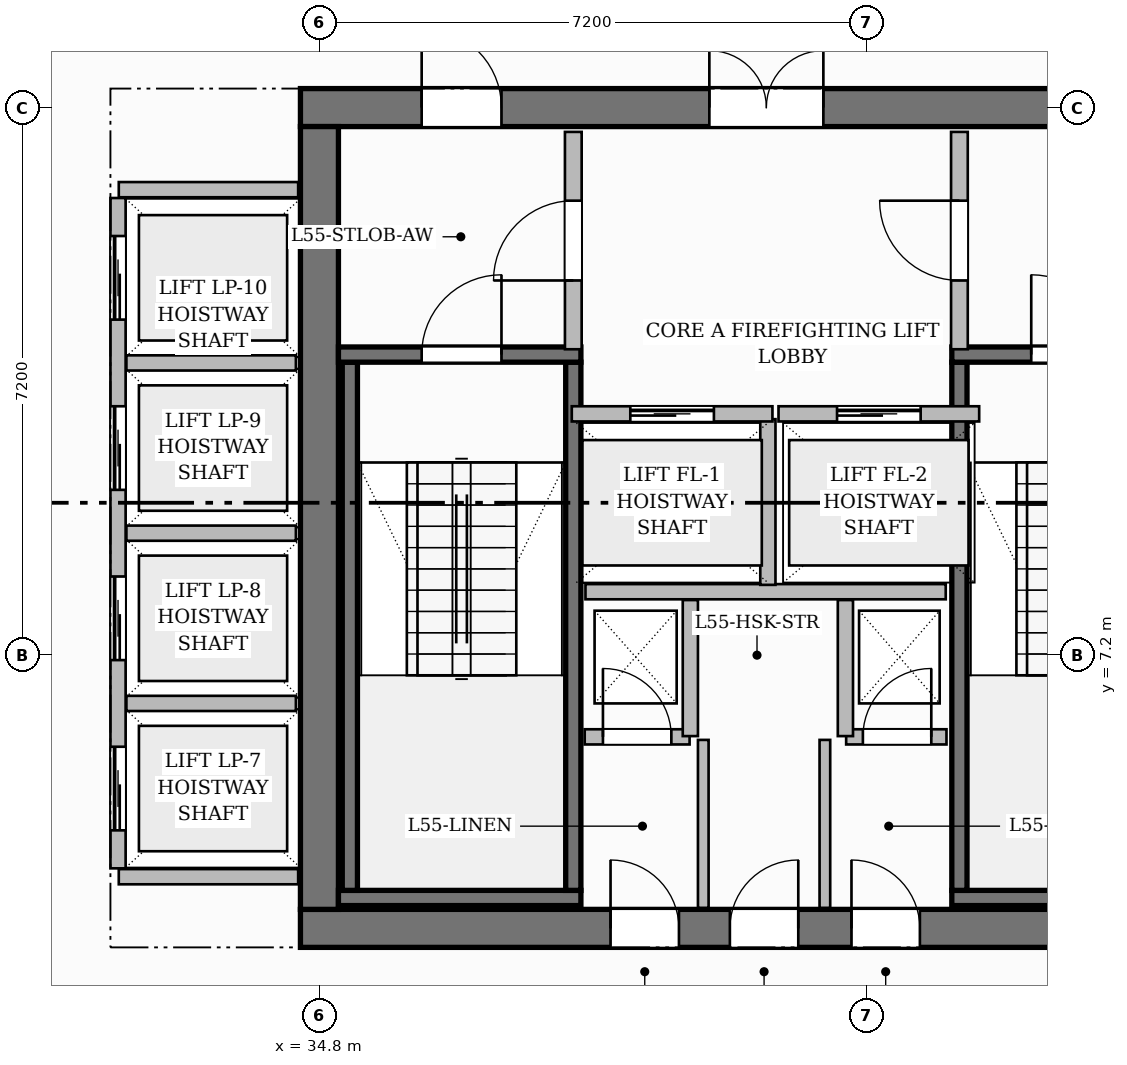
"""IFC4 building model, lengths in metres.
Left out: names, types, materials, properties, quantities, classifications, styles, units other than length and angle.
Written with IfcOpenShell. Run it as: python <this file> out.ifc"""

import sys

from ifc_helpers import new_model, si_unit, direction, frame, frame_2d, origin, place, context, subcontext, project, spatial, rectangle, extrude, source, transform, mapped, element, fill, save


model = new_model("IFC4")
c1 = context("Model", 3, precision=1e-05, world=origin(), true_north=direction((0.0, 1.0)))
c2 = subcontext(c1, "Body", "Model", "MODEL_VIEW")
j1 = project(units=[si_unit("LENGTHUNIT", "METRE"), si_unit("PLANEANGLEUNIT", "RADIAN")], contexts=[c1])
p1 = place(None, origin())
s1 = spatial("IfcSite", under=j1, at=p1, CompositionType="ELEMENT")
p2 = place(p1, origin())
s2 = spatial("IfcBuilding", under=s1, at=p2, CompositionType="ELEMENT")
p3 = place(p2, frame((0.0, 0.0, 221.15)))
s3 = spatial("IfcBuildingStorey", under=s2, at=p3, CompositionType="ELEMENT", Elevation=221.15)
p4 = place(p3, frame((34.55, 3.6, 0.0), z_axis=(0.0, 0.0, 1.0), x_axis=(1.0, 0.0, 0.0)))
e1 = element("IfcWall", 1, at=p4, inside=s3, PredefinedType="SHEAR", context=c2, shape_type="SweptSolid", body=[
    extrude(rectangle(XDim=15.5, YDim=0.5, at=frame_2d((7.75, 0.0))), origin(), (0.0, 0.0, 1.0), 3.85),
])
p5 = place(p4, frame((4.08, 0.0, 0.0)))
e2 = element("IfcOpeningElement", 2, at=p5, cuts=e1, PredefinedType="OPENING", context=c2, shape_type="SweptSolid", body=[
    extrude(rectangle(XDim=0.9, YDim=2.1, at=frame_2d((0.45, 1.05))), frame((0.0, 0.26, 0.0), z_axis=(0.0, -1.0, 0.0), x_axis=(1.0, 0.0, 0.0)), (0.0, 0.0, 1.0), 0.52),
])
p6 = place(p4, frame((5.65, 0.0, 0.0)))
e3 = element("IfcOpeningElement", 3, at=p6, cuts=e1, PredefinedType="OPENING", context=c2, shape_type="SweptSolid", body=[
    extrude(rectangle(XDim=0.9, YDim=2.1, at=frame_2d((0.45, 1.05))), frame((0.0, 0.26, 0.0), z_axis=(0.0, -1.0, 0.0), x_axis=(1.0, 0.0, 0.0)), (0.0, 0.0, 1.0), 0.52),
])
p7 = place(p4, frame((7.25, 0.0, 0.0)))
e4 = element("IfcOpeningElement", 4, at=p7, cuts=e1, PredefinedType="OPENING", context=c2, shape_type="SweptSolid", body=[
    extrude(rectangle(XDim=0.9, YDim=2.1, at=frame_2d((0.45, 1.05))), frame((0.0, 0.26, 0.0), z_axis=(0.0, -1.0, 0.0), x_axis=(1.0, 0.0, 0.0)), (0.0, 0.0, 1.0), 0.52),
])
p8 = place(p3, frame((34.55, 14.4, 0.0), z_axis=(0.0, 0.0, 1.0), x_axis=(1.0, 0.0, 0.0)))
e5 = element("IfcWall", 5, at=p8, inside=s3, PredefinedType="SHEAR", context=c2, shape_type="SweptSolid", body=[
    extrude(rectangle(XDim=15.5, YDim=0.5, at=frame_2d((7.75, 0.0))), origin(), (0.0, 0.0, 1.0), 3.85),
])
p9 = place(p8, frame((5.38, 0.0, 0.0)))
e6 = element("IfcOpeningElement", 6, at=p9, cuts=e5, PredefinedType="OPENING", context=c2, shape_type="SweptSolid", body=[
    extrude(rectangle(XDim=1.5, YDim=2.2, at=frame_2d((0.75, 1.1))), frame((0.0, 0.26, 0.0), z_axis=(0.0, -1.0, 0.0), x_axis=(1.0, 0.0, 0.0)), (0.0, 0.0, 1.0), 0.52),
])
p10 = place(p8, frame((1.595, 0.0, 0.0)))
e7 = element("IfcOpeningElement", 7, at=p10, cuts=e5, PredefinedType="OPENING", context=c2, shape_type="SweptSolid", body=[
    extrude(rectangle(XDim=1.05, YDim=2.15, at=frame_2d((0.525, 1.075))), frame((0.0, 0.26, 0.0), z_axis=(0.0, -1.0, 0.0), x_axis=(1.0, 0.0, 0.0)), (0.0, 0.0, 1.0), 0.52),
])
p11 = place(p8, frame((11.225, 0.0, 0.0)))
e8 = element("IfcOpeningElement", 8, at=p11, cuts=e5, PredefinedType="OPENING", context=c2, shape_type="SweptSolid", body=[
    extrude(rectangle(XDim=1.05, YDim=2.15, at=frame_2d((0.525, 1.075))), frame((0.0, 0.26, 0.0), z_axis=(0.0, -1.0, 0.0), x_axis=(1.0, 0.0, 0.0)), (0.0, 0.0, 1.0), 0.52),
])
p12 = place(p3, frame((34.8, 3.85, 0.0), z_axis=(0.0, 0.0, 1.0), x_axis=(0.0, 1.0, 0.0)))
e9 = element("IfcWall", 9, at=p12, inside=s3, PredefinedType="SHEAR", context=c2, shape_type="SweptSolid", body=[
    extrude(rectangle(XDim=10.3, YDim=0.5, at=frame_2d((5.15, 0.0))), origin(), (0.0, 0.0, 1.0), 3.85),
])
p13 = place(p3, frame((35.05, 4.0, 0.0), z_axis=(0.0, 0.0, 1.0), x_axis=(1.0, 0.0, 0.0)))
e10 = element("IfcWall", 10, at=p13, inside=s3, PredefinedType="SHEAR", context=c2, shape_type="SweptSolid", body=[
    extrude(rectangle(XDim=3.19, YDim=0.2, at=frame_2d((1.595, 0.0))), origin(), (0.0, 0.0, 1.0), 3.85),
])
for number, where, z_axis, x_axis in (
    (11, (35.2, 4.1, 0.0), (0.0, 0.0, 1.0), (0.0, 1.0, 0.0)),
    (12, (38.14, 4.1, 0.0), (0.0, 0.0, 1.0), (0.0, 1.0, 0.0)),
):
    element("IfcWall", number, at=place(p3, frame(where, z_axis=z_axis, x_axis=x_axis)), inside=s3, PredefinedType="SHEAR", context=c2, shape_type="SweptSolid", body=[
        extrude(rectangle(XDim=6.95, YDim=0.2, at=frame_2d((3.475, 0.0))), origin(), (0.0, 0.0, 1.0), 3.85),
    ])
p14 = place(p3, frame((35.05, 11.15, 0.0), z_axis=(0.0, 0.0, 1.0), x_axis=(1.0, 0.0, 0.0)))
e13 = element("IfcWall", 13, at=p14, inside=s3, PredefinedType="SHEAR", context=c2, shape_type="SweptSolid", body=[
    extrude(rectangle(XDim=3.19, YDim=0.2, at=frame_2d((1.595, 0.0))), origin(), (0.0, 0.0, 1.0), 3.85),
])
p15 = place(p14, frame((1.095, 0.0, 0.0)))
e14 = element("IfcOpeningElement", 14, at=p15, cuts=e13, PredefinedType="OPENING", context=c2, shape_type="SweptSolid", body=[
    extrude(rectangle(XDim=1.05, YDim=2.2, at=frame_2d((0.525, 1.1))), frame((0.0, 0.11, 0.0), z_axis=(0.0, -1.0, 0.0), x_axis=(1.0, 0.0, 0.0)), (0.0, 0.0, 1.0), 0.22),
])
p16 = place(p3, frame((43.12, 4.0, 0.0), z_axis=(0.0, 0.0, 1.0), x_axis=(1.0, 0.0, 0.0)))
e15 = element("IfcWall", 15, at=p16, inside=s3, PredefinedType="SHEAR", context=c2, shape_type="SweptSolid", body=[
    extrude(rectangle(XDim=6.43, YDim=0.2, at=frame_2d((3.215, 0.0))), origin(), (0.0, 0.0, 1.0), 3.85),
])
p17 = place(p3, frame((43.22, 4.1, 0.0), z_axis=(0.0, 0.0, 1.0), x_axis=(0.0, 1.0, 0.0)))
e16 = element("IfcWall", 16, at=p17, inside=s3, PredefinedType="SHEAR", context=c2, shape_type="SweptSolid", body=[
    extrude(rectangle(XDim=6.95, YDim=0.2, at=frame_2d((3.475, 0.0))), origin(), (0.0, 0.0, 1.0), 3.85),
])
p18 = place(p3, frame((43.12, 11.15, 0.0), z_axis=(0.0, 0.0, 1.0), x_axis=(1.0, 0.0, 0.0)))
e17 = element("IfcWall", 17, at=p18, inside=s3, PredefinedType="SHEAR", context=c2, shape_type="SweptSolid", body=[
    extrude(rectangle(XDim=6.43, YDim=0.2, at=frame_2d((3.215, 0.0))), origin(), (0.0, 0.0, 1.0), 3.85),
])
p19 = place(p18, frame((1.045, 0.0, 0.0)))
e18 = element("IfcOpeningElement", 18, at=p19, cuts=e17, PredefinedType="OPENING", context=c2, shape_type="SweptSolid", body=[
    extrude(rectangle(XDim=1.05, YDim=2.2, at=frame_2d((0.525, 1.1))), frame((0.0, 0.11, 0.0), z_axis=(0.0, -1.0, 0.0), x_axis=(1.0, 0.0, 0.0)), (0.0, 0.0, 1.0), 0.22),
])
p20 = place(p18, frame((4.125, 0.0, 0.0)))
e19 = element("IfcOpeningElement", 19, at=p20, cuts=e17, PredefinedType="OPENING", context=c2, shape_type="SweptSolid", body=[
    extrude(rectangle(XDim=1.05, YDim=2.2, at=frame_2d((0.525, 1.1))), frame((0.0, 0.11, 0.0), z_axis=(0.0, -1.0, 0.0), x_axis=(1.0, 0.0, 0.0)), (0.0, 0.0, 1.0), 0.22),
])
p21 = place(p3, frame((38.3, 8.03, 0.0), z_axis=(0.0, 0.0, 1.0), x_axis=(1.0, 0.0, 0.0)))
e20 = element("IfcWall", 20, at=p21, inside=s3, PredefinedType="PARTITIONING", context=c2, shape_type="SweptSolid", body=[
    extrude(rectangle(XDim=4.74, YDim=0.2, at=frame_2d((2.37, 0.0))), origin(), (0.0, 0.0, 1.0), 3.6),
])
p22 = place(p3, frame((40.7, 8.12, 0.0), z_axis=(0.0, 0.0, 1.0), x_axis=(0.0, 1.0, 0.0)))
e21 = element("IfcWall", 21, at=p22, inside=s3, PredefinedType="PARTITIONING", context=c2, shape_type="SweptSolid", body=[
    extrude(rectangle(XDim=2.18, YDim=0.2, at=frame_2d((1.09, 0.0))), origin(), (0.0, 0.0, 1.0), 3.6),
])
p23 = place(p3, frame((38.14, 11.22, 0.0), z_axis=(0.0, 0.0, 1.0), x_axis=(0.0, 1.0, 0.0)))
e22 = element("IfcWall", 22, at=p23, inside=s3, PredefinedType="PARTITIONING", context=c2, shape_type="SweptSolid", body=[
    extrude(rectangle(XDim=2.86, YDim=0.22, at=frame_2d((1.43, 0.0))), origin(), (0.0, 0.0, 1.0), 3.6),
])
p24 = place(p23, frame((0.905, 0.0, 0.0)))
e23 = element("IfcOpeningElement", 23, at=p24, cuts=e22, PredefinedType="OPENING", context=c2, shape_type="SweptSolid", body=[
    extrude(rectangle(XDim=1.05, YDim=2.15, at=frame_2d((0.525, 1.075))), frame((0.0, 0.12, 0.0), z_axis=(0.0, -1.0, 0.0), x_axis=(1.0, 0.0, 0.0)), (0.0, 0.0, 1.0), 0.24),
])
p25 = place(p3, frame((43.22, 11.22, 0.0), z_axis=(0.0, 0.0, 1.0), x_axis=(0.0, 1.0, 0.0)))
e24 = element("IfcWall", 24, at=p25, inside=s3, PredefinedType="PARTITIONING", context=c2, shape_type="SweptSolid", body=[
    extrude(rectangle(XDim=2.86, YDim=0.22, at=frame_2d((1.43, 0.0))), origin(), (0.0, 0.0, 1.0), 3.6),
])
p26 = place(p25, frame((0.905, 0.0, 0.0)))
e25 = element("IfcOpeningElement", 25, at=p26, cuts=e24, PredefinedType="OPENING", context=c2, shape_type="SweptSolid", body=[
    extrude(rectangle(XDim=1.05, YDim=2.15, at=frame_2d((0.525, 1.075))), frame((0.0, 0.12, 0.0), z_axis=(0.0, -1.0, 0.0), x_axis=(1.0, 0.0, 0.0)), (0.0, 0.0, 1.0), 0.24),
])
p27 = place(p3, frame((38.29, 6.12, 0.0), z_axis=(0.0, 0.0, 1.0), x_axis=(1.0, 0.0, 0.0)))
e26 = element("IfcWall", 26, at=p27, inside=s3, PredefinedType="PARTITIONING", context=c2, shape_type="SweptSolid", body=[
    extrude(rectangle(XDim=1.38, YDim=0.2, at=frame_2d((0.69, 0.0))), origin(), (0.0, 0.0, 1.0), 3.6),
])
p28 = place(p27, frame((0.24, 0.0, 0.0)))
e27 = element("IfcOpeningElement", 27, at=p28, cuts=e26, PredefinedType="OPENING", context=c2, shape_type="SweptSolid", body=[
    extrude(rectangle(XDim=0.9, YDim=2.1, at=frame_2d((0.45, 1.05))), frame((0.0, 0.11, 0.0), z_axis=(0.0, -1.0, 0.0), x_axis=(1.0, 0.0, 0.0)), (0.0, 0.0, 1.0), 0.22),
])
p29 = place(p3, frame((39.68, 6.13, 0.0), z_axis=(0.0, 0.0, 1.0), x_axis=(0.0, 1.0, 0.0)))
e28 = element("IfcWall", 28, at=p29, inside=s3, PredefinedType="PARTITIONING", context=c2, shape_type="SweptSolid", body=[
    extrude(rectangle(XDim=1.79, YDim=0.2, at=frame_2d((0.895, 0.0))), origin(), (0.0, 0.0, 1.0), 3.6),
])
p30 = place(p3, frame((41.73, 6.12, 0.0), z_axis=(0.0, 0.0, 1.0), x_axis=(1.0, 0.0, 0.0)))
e29 = element("IfcWall", 29, at=p30, inside=s3, PredefinedType="PARTITIONING", context=c2, shape_type="SweptSolid", body=[
    extrude(rectangle(XDim=1.32, YDim=0.2, at=frame_2d((0.66, 0.0))), origin(), (0.0, 0.0, 1.0), 3.6),
])
p31 = place(p30, frame((0.22, 0.0, 0.0)))
e30 = element("IfcOpeningElement", 30, at=p31, cuts=e29, PredefinedType="OPENING", context=c2, shape_type="SweptSolid", body=[
    extrude(rectangle(XDim=0.9, YDim=2.1, at=frame_2d((0.45, 1.05))), frame((0.0, 0.11, 0.0), z_axis=(0.0, -1.0, 0.0), x_axis=(1.0, 0.0, 0.0)), (0.0, 0.0, 1.0), 0.22),
])
p32 = place(p3, frame((41.72, 6.13, 0.0), z_axis=(0.0, 0.0, 1.0), x_axis=(0.0, 1.0, 0.0)))
e31 = element("IfcWall", 31, at=p32, inside=s3, PredefinedType="PARTITIONING", context=c2, shape_type="SweptSolid", body=[
    extrude(rectangle(XDim=1.79, YDim=0.2, at=frame_2d((0.895, 0.0))), origin(), (0.0, 0.0, 1.0), 3.6),
])
for number, where, z_axis, x_axis in (
    (32, (39.85, 3.87, 0.0), (0.0, 0.0, 1.0), (0.0, 1.0, 0.0)),
    (33, (41.45, 3.87, 0.0), (0.0, 0.0, 1.0), (0.0, 1.0, 0.0)),
):
    element("IfcWall", number, at=place(p3, frame(where, z_axis=z_axis, x_axis=x_axis)), inside=s3, PredefinedType="PARTITIONING", context=c2, shape_type="SweptSolid", body=[
        extrude(rectangle(XDim=2.21, YDim=0.14, at=frame_2d((1.105, 0.0))), origin(), (0.0, 0.0, 1.0), 3.6),
    ])
for number, where, z_axis, x_axis in (
    (34, (32.16, 4.28, 0.0), (0.0, 0.0, 1.0), (1.0, 0.0, 0.0)),
    (35, (32.16, 13.32, 0.0), (0.0, 0.0, 1.0), (1.0, 0.0, 0.0)),
):
    element("IfcWall", number, at=place(p3, frame(where, z_axis=z_axis, x_axis=x_axis)), inside=s3, PredefinedType="PARTITIONING", context=c2, shape_type="SweptSolid", body=[
        extrude(rectangle(XDim=2.36, YDim=0.2, at=frame_2d((1.18, 0.0))), origin(), (0.0, 0.0, 1.0), 3.6),
    ])
p33 = place(p3, frame((32.15, 4.39, 0.0), z_axis=(0.0, 0.0, 1.0), x_axis=(0.0, 1.0, 0.0)))
e36 = element("IfcWall", 36, at=p33, inside=s3, PredefinedType="PARTITIONING", context=c2, shape_type="SweptSolid", body=[
    extrude(rectangle(XDim=8.82, YDim=0.2, at=frame_2d((4.41, 0.0))), origin(), (0.0, 0.0, 1.0), 3.6),
])
p34 = place(p33, frame((0.5, 0.0, 0.0)))
e37 = element("IfcOpeningElement", 37, at=p34, cuts=e36, PredefinedType="OPENING", context=c2, shape_type="SweptSolid", body=[
    extrude(rectangle(XDim=1.1, YDim=2.2, at=frame_2d((0.55, 1.1))), frame((0.0, 0.11, 0.0), z_axis=(0.0, -1.0, 0.0), x_axis=(1.0, 0.0, 0.0)), (0.0, 0.0, 1.0), 0.22),
])
p35 = place(p33, frame((2.74, 0.0, 0.0)))
e38 = element("IfcOpeningElement", 38, at=p35, cuts=e36, PredefinedType="OPENING", context=c2, shape_type="SweptSolid", body=[
    extrude(rectangle(XDim=1.1, YDim=2.2, at=frame_2d((0.55, 1.1))), frame((0.0, 0.11, 0.0), z_axis=(0.0, -1.0, 0.0), x_axis=(1.0, 0.0, 0.0)), (0.0, 0.0, 1.0), 0.22),
])
p36 = place(p33, frame((4.98, 0.0, 0.0)))
e39 = element("IfcOpeningElement", 39, at=p36, cuts=e36, PredefinedType="OPENING", context=c2, shape_type="SweptSolid", body=[
    extrude(rectangle(XDim=1.1, YDim=2.2, at=frame_2d((0.55, 1.1))), frame((0.0, 0.11, 0.0), z_axis=(0.0, -1.0, 0.0), x_axis=(1.0, 0.0, 0.0)), (0.0, 0.0, 1.0), 0.22),
])
p37 = place(p33, frame((7.22, 0.0, 0.0)))
e40 = element("IfcOpeningElement", 40, at=p37, cuts=e36, PredefinedType="OPENING", context=c2, shape_type="SweptSolid", body=[
    extrude(rectangle(XDim=1.1, YDim=2.2, at=frame_2d((0.55, 1.1))), frame((0.0, 0.11, 0.0), z_axis=(0.0, -1.0, 0.0), x_axis=(1.0, 0.0, 0.0)), (0.0, 0.0, 1.0), 0.22),
])
for number, where, z_axis, x_axis in (
    (41, (32.26, 6.56, 0.0), (0.0, 0.0, 1.0), (1.0, 0.0, 0.0)),
    (42, (32.26, 8.8, 0.0), (0.0, 0.0, 1.0), (1.0, 0.0, 0.0)),
    (43, (32.26, 11.04, 0.0), (0.0, 0.0, 1.0), (1.0, 0.0, 0.0)),
):
    element("IfcWall", number, at=place(p3, frame(where, z_axis=z_axis, x_axis=x_axis)), inside=s3, PredefinedType="PARTITIONING", context=c2, shape_type="SweptSolid", body=[
        extrude(rectangle(XDim=2.23, YDim=0.2, at=frame_2d((1.115, 0.0))), origin(), (0.0, 0.0, 1.0), 3.6),
    ])
p38 = place(p3, frame((38.12, 10.37, 0.0), z_axis=(0.0, 0.0, 1.0), x_axis=(1.0, 0.0, 0.0)))
e44 = element("IfcWall", 44, at=p38, inside=s3, PredefinedType="PARTITIONING", context=c2, shape_type="SweptSolid", body=[
    extrude(rectangle(XDim=2.64, YDim=0.2, at=frame_2d((1.32, 0.0))), origin(), (0.0, 0.0, 1.0), 3.6),
])
p39 = place(p38, frame((0.77, 0.0, 0.0)))
e45 = element("IfcOpeningElement", 45, at=p39, cuts=e44, PredefinedType="OPENING", context=c2, shape_type="SweptSolid", body=[
    extrude(rectangle(XDim=1.1, YDim=2.2, at=frame_2d((0.55, 1.1))), frame((0.0, 0.11, 0.0), z_axis=(0.0, -1.0, 0.0), x_axis=(1.0, 0.0, 0.0)), (0.0, 0.0, 1.0), 0.22),
])
p40 = place(p3, frame((40.84, 10.37, 0.0), z_axis=(0.0, 0.0, 1.0), x_axis=(1.0, 0.0, 0.0)))
e46 = element("IfcWall", 46, at=p40, inside=s3, PredefinedType="PARTITIONING", context=c2, shape_type="SweptSolid", body=[
    extrude(rectangle(XDim=2.64, YDim=0.2, at=frame_2d((1.32, 0.0))), origin(), (0.0, 0.0, 1.0), 3.6),
])
p41 = place(p40, frame((0.77, 0.0, 0.0)))
e47 = element("IfcOpeningElement", 47, at=p41, cuts=e46, PredefinedType="OPENING", context=c2, shape_type="SweptSolid", body=[
    extrude(rectangle(XDim=1.1, YDim=2.2, at=frame_2d((0.55, 1.1))), frame((0.0, 0.11, 0.0), z_axis=(0.0, -1.0, 0.0), x_axis=(1.0, 0.0, 0.0)), (0.0, 0.0, 1.0), 0.22),
])
m1 = source(origin(), c2, "Body", "SweptSolid", [
    extrude(rectangle(XDim=1.05, YDim=2.2, at=frame_2d((0.525, 1.1))), frame((0.0, 0.025, 0.0), z_axis=(0.0, -1.0, 0.0), x_axis=(1.0, 0.0, 0.0)), (0.0, 0.0, 1.0), 0.05),
])
p42 = place(p15, origin())
e48 = element("IfcDoor", 48, at=p42, inside=s3, OperationType="SINGLE_SWING_RIGHT", PredefinedType="DOOR", context=c2, shape_type="MappedRepresentation", body=[
    mapped(m1, transform((0.0, 0.0, 0.0), scale=1.0)),
])
fill(e14, e48)
p43 = place(p19, origin())
e49 = element("IfcDoor", 49, at=p43, inside=s3, OperationType="SINGLE_SWING_LEFT", PredefinedType="DOOR", context=c2, shape_type="MappedRepresentation", body=[
    mapped(m1, transform((0.0, 0.0, 0.0), scale=1.0)),
])
fill(e18, e49)
m2 = source(origin(), c2, "Body", "SweptSolid", [
    extrude(rectangle(XDim=1.05, YDim=2.15, at=frame_2d((0.525, 1.075))), frame((0.0, 0.025, 0.0), z_axis=(0.0, -1.0, 0.0), x_axis=(1.0, 0.0, 0.0)), (0.0, 0.0, 1.0), 0.05),
])
p44 = place(p24, origin())
e50 = element("IfcDoor", 50, at=p44, inside=s3, OperationType="SINGLE_SWING_LEFT", PredefinedType="DOOR", context=c2, shape_type="MappedRepresentation", body=[
    mapped(m2, transform((0.0, 0.0, 0.0), scale=1.0)),
])
fill(e23, e50)
p45 = place(p26, origin())
e51 = element("IfcDoor", 51, at=p45, inside=s3, OperationType="SINGLE_SWING_RIGHT", PredefinedType="DOOR", context=c2, shape_type="MappedRepresentation", body=[
    mapped(m2, transform((0.0, 0.0, 0.0), scale=1.0)),
])
fill(e25, e51)
m3 = source(origin(), c2, "Body", "SweptSolid", [
    extrude(rectangle(XDim=1.5, YDim=2.2, at=frame_2d((0.75, 1.1))), frame((0.0, 0.025, 0.0), z_axis=(0.0, -1.0, 0.0), x_axis=(1.0, 0.0, 0.0)), (0.0, 0.0, 1.0), 0.05),
])
p46 = place(p9, origin())
e52 = element("IfcDoor", 52, at=p46, inside=s3, OperationType="DOUBLE_DOOR_SINGLE_SWING", PredefinedType="DOOR", context=c2, shape_type="MappedRepresentation", body=[
    mapped(m3, transform((0.0, 0.0, 0.0), scale=1.0)),
])
fill(e6, e52)
p47 = place(p10, origin())
e53 = element("IfcDoor", 53, at=p47, inside=s3, OperationType="SINGLE_SWING_LEFT", PredefinedType="DOOR", context=c2, shape_type="MappedRepresentation", body=[
    mapped(m2, transform((0.0, 0.0, 0.0), scale=1.0)),
])
fill(e7, e53)
m4 = source(origin(), c2, "Body", "SweptSolid", [
    extrude(rectangle(XDim=0.9, YDim=2.1, at=frame_2d((0.45, 1.05))), frame((0.0, 0.025, 0.0), z_axis=(0.0, -1.0, 0.0), x_axis=(1.0, 0.0, 0.0)), (0.0, 0.0, 1.0), 0.05),
])
p48 = place(p28, origin())
e54 = element("IfcDoor", 54, at=p48, inside=s3, OperationType="SINGLE_SWING_LEFT", PredefinedType="DOOR", context=c2, shape_type="MappedRepresentation", body=[
    mapped(m4, transform((0.0, 0.0, 0.0), scale=1.0)),
])
fill(e27, e54)
p49 = place(p31, origin())
e55 = element("IfcDoor", 55, at=p49, inside=s3, OperationType="SINGLE_SWING_RIGHT", PredefinedType="DOOR", context=c2, shape_type="MappedRepresentation", body=[
    mapped(m4, transform((0.0, 0.0, 0.0), scale=1.0)),
])
fill(e30, e55)
p50 = place(p5, origin())
e56 = element("IfcDoor", 56, at=p50, inside=s3, OperationType="SINGLE_SWING_LEFT", PredefinedType="DOOR", context=c2, shape_type="MappedRepresentation", body=[
    mapped(m4, transform((0.0, 0.0, 0.0), scale=1.0)),
])
fill(e2, e56)
p51 = place(p6, origin())
e57 = element("IfcDoor", 57, at=p51, inside=s3, OperationType="SINGLE_SWING_RIGHT", PredefinedType="DOOR", context=c2, shape_type="MappedRepresentation", body=[
    mapped(m4, transform((0.0, 0.0, 0.0), scale=1.0)),
])
fill(e3, e57)
p52 = place(p7, origin())
e58 = element("IfcDoor", 58, at=p52, inside=s3, OperationType="SINGLE_SWING_LEFT", PredefinedType="DOOR", context=c2, shape_type="MappedRepresentation", body=[
    mapped(m4, transform((0.0, 0.0, 0.0), scale=1.0)),
])
fill(e4, e58)
m5 = source(origin(), c2, "Body", "SweptSolid", [
    extrude(rectangle(XDim=1.1, YDim=2.2, at=frame_2d((0.55, 1.1))), frame((0.0, 0.025, 0.0), z_axis=(0.0, -1.0, 0.0), x_axis=(1.0, 0.0, 0.0)), (0.0, 0.0, 1.0), 0.05),
])
p53 = place(p39, origin())
e59 = element("IfcDoor", 59, at=p53, inside=s3, OperationType="SLIDING_TO_LEFT", PredefinedType="DOOR", context=c2, shape_type="MappedRepresentation", body=[
    mapped(m5, transform((0.0, 0.0, 0.0), scale=1.0)),
])
fill(e45, e59)
p54 = place(p41, origin())
e60 = element("IfcDoor", 60, at=p54, inside=s3, OperationType="SLIDING_TO_LEFT", PredefinedType="DOOR", context=c2, shape_type="MappedRepresentation", body=[
    mapped(m5, transform((0.0, 0.0, 0.0), scale=1.0)),
])
fill(e47, e60)
p55 = place(p34, origin())
e61 = element("IfcDoor", 61, at=p55, inside=s3, OperationType="SLIDING_TO_LEFT", PredefinedType="DOOR", context=c2, shape_type="MappedRepresentation", body=[
    mapped(m5, transform((0.0, 0.0, 0.0), scale=1.0)),
])
fill(e37, e61)
p56 = place(p35, origin())
e62 = element("IfcDoor", 62, at=p56, inside=s3, OperationType="SLIDING_TO_LEFT", PredefinedType="DOOR", context=c2, shape_type="MappedRepresentation", body=[
    mapped(m5, transform((0.0, 0.0, 0.0), scale=1.0)),
])
fill(e38, e62)
p57 = place(p36, origin())
e63 = element("IfcDoor", 63, at=p57, inside=s3, OperationType="SLIDING_TO_LEFT", PredefinedType="DOOR", context=c2, shape_type="MappedRepresentation", body=[
    mapped(m5, transform((0.0, 0.0, 0.0), scale=1.0)),
])
fill(e39, e63)
p58 = place(p37, origin())
e64 = element("IfcDoor", 64, at=p58, inside=s3, OperationType="SLIDING_TO_LEFT", PredefinedType="DOOR", context=c2, shape_type="MappedRepresentation", body=[
    mapped(m5, transform((0.0, 0.0, 0.0), scale=1.0)),
])
fill(e40, e64)
save(model, sys.argv[1])
